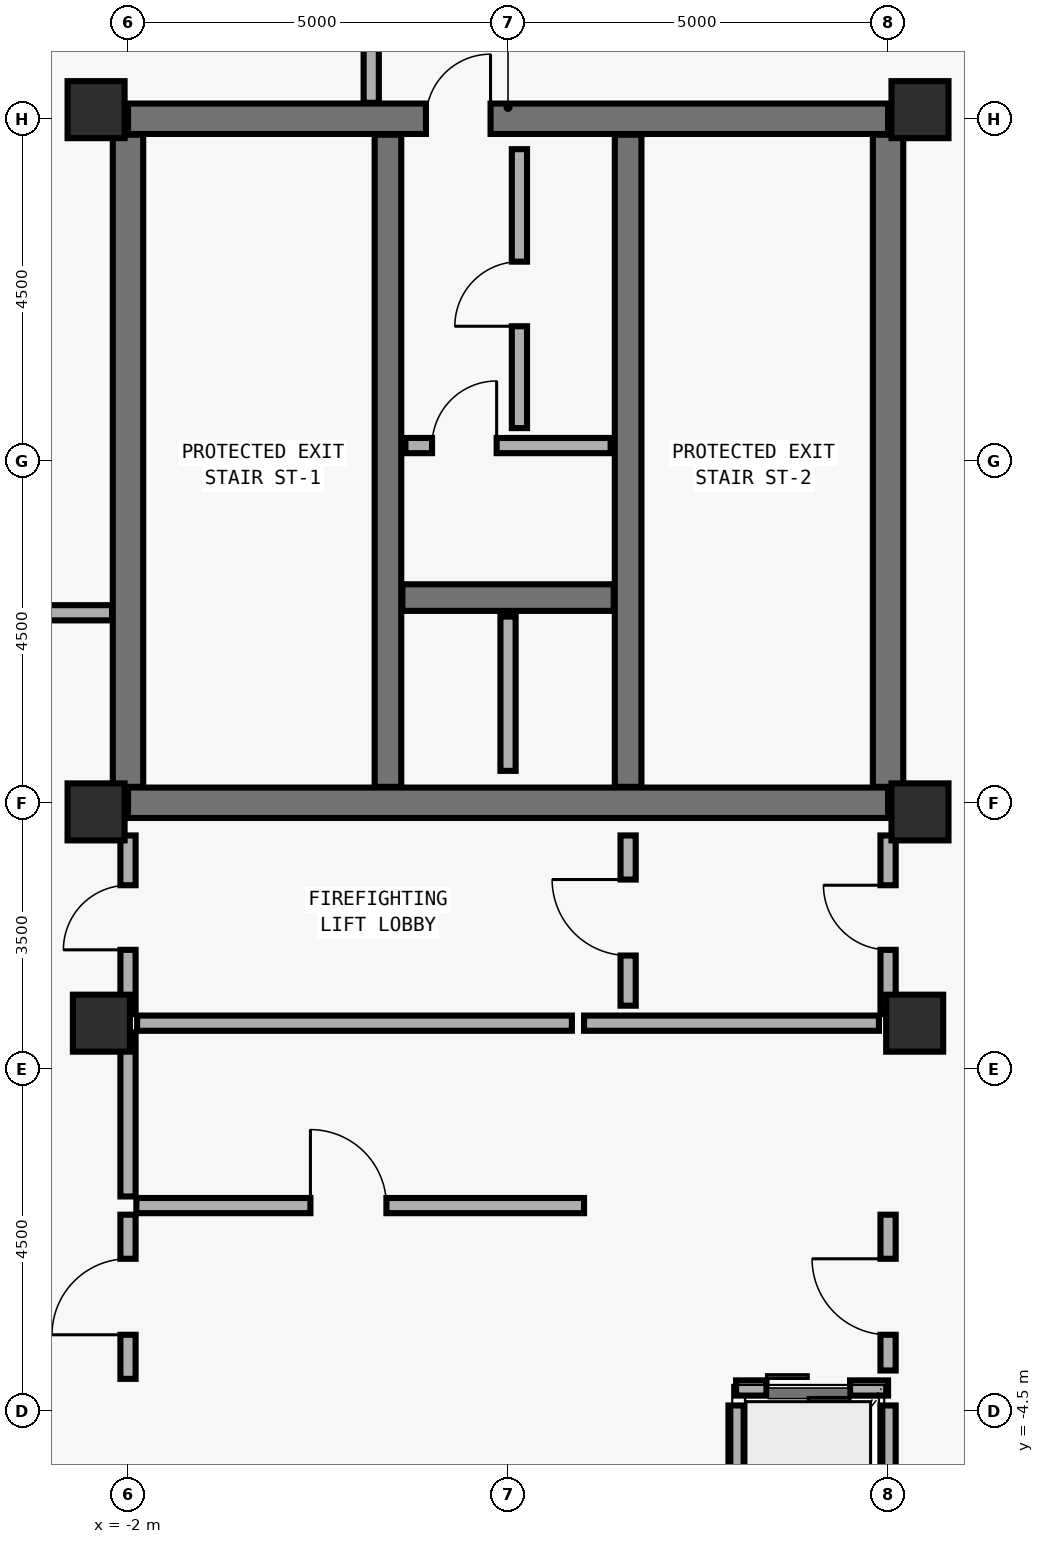
"""IFC4 building model, lengths in metres.
Left out: names, types, materials, properties, quantities, classifications, styles, units other than length and angle.
Written with IfcOpenShell. Run it as: python <this file> out.ifc"""

import sys

from ifc_helpers import new_model, si_unit, direction, frame, frame_2d, origin, origin_2d, place, context, subcontext, project, spatial, rectangle, extrude, element, fill, save


model = new_model("IFC4")
c1 = context("Model", 3, precision=1e-05, world=origin(), true_north=direction((0.0, 1.0)))
c2 = subcontext(c1, "Body", "Model", "MODEL_VIEW")
j1 = project(units=[si_unit("LENGTHUNIT", "METRE"), si_unit("PLANEANGLEUNIT", "RADIAN")], contexts=[c1])
p1 = place(None, origin())
s1 = spatial("IfcSite", under=j1, at=p1, CompositionType="ELEMENT")
p2 = place(p1, origin())
s2 = spatial("IfcBuilding", under=s1, at=p2, CompositionType="ELEMENT")
p3 = place(p2, frame((0.0, 0.0, 306.6)))
s3 = spatial("IfcBuildingStorey", under=s2, at=p3, CompositionType="ELEMENT", Elevation=306.6)
p4 = place(p3, frame((-2.0, 3.5, 0.0), z_axis=(0.0, 0.0, 1.0), x_axis=(1.0, 0.0, 0.0)))
e1 = element("IfcWall", 1, at=p4, inside=s3, PredefinedType="SHEAR", context=c2, shape_type="SweptSolid", body=[
    extrude(rectangle(XDim=10.0, YDim=0.4, at=frame_2d((5.0, 0.0))), origin(), (0.0, 0.0, 1.0), 4.192),
])
p5 = place(p3, frame((-2.0, 12.5, 0.0), z_axis=(0.0, 0.0, 1.0), x_axis=(1.0, 0.0, 0.0)))
e2 = element("IfcWall", 2, at=p5, inside=s3, PredefinedType="SHEAR", context=c2, shape_type="SweptSolid", body=[
    extrude(rectangle(XDim=10.0, YDim=0.4, at=frame_2d((5.0, 0.0))), origin(), (0.0, 0.0, 1.0), 4.192),
])
p6 = place(p5, frame((3.92, 0.0, 0.0)))
e3 = element("IfcOpeningElement", 3, at=p6, cuts=e2, PredefinedType="OPENING", context=c2, shape_type="SweptSolid", body=[
    extrude(rectangle(XDim=0.85, YDim=2.1, at=frame_2d((0.425, 1.05))), frame((0.0, 0.21, 0.0), z_axis=(0.0, -1.0, 0.0), x_axis=(1.0, 0.0, 0.0)), (0.0, 0.0, 1.0), 0.42),
])
for number, where, z_axis, x_axis in (
    (4, (-2.0, 3.71, 0.0), (0.0, 0.0, 1.0), (0.0, 1.0, 0.0)),
    (5, (8.0, 3.71, 0.0), (0.0, 0.0, 1.0), (0.0, 1.0, 0.0)),
):
    element("IfcWall", number, at=place(p3, frame(where, z_axis=z_axis, x_axis=x_axis)), inside=s3, PredefinedType="SHEAR", context=c2, shape_type="SweptSolid", body=[
        extrude(rectangle(XDim=8.58, YDim=0.4, at=frame_2d((4.29, 0.0))), origin(), (0.0, 0.0, 1.0), 4.192),
    ])
for number, where, z_axis, x_axis in (
    (6, (1.42, 3.71, 0.0), (0.0, 0.0, 1.0), (0.0, 1.0, 0.0)),
    (7, (4.58, 3.71, 0.0), (0.0, 0.0, 1.0), (0.0, 1.0, 0.0)),
):
    element("IfcWall", number, at=place(p3, frame(where, z_axis=z_axis, x_axis=x_axis)), inside=s3, PredefinedType="SHEAR", context=c2, shape_type="SweptSolid", body=[
        extrude(rectangle(XDim=8.58, YDim=0.35, at=frame_2d((4.29, 0.0))), origin(), (0.0, 0.0, 1.0), 4.192),
    ])
p7 = place(p3, frame((1.61, 6.2, 0.0), z_axis=(0.0, 0.0, 1.0), x_axis=(1.0, 0.0, 0.0)))
e8 = element("IfcWall", 8, at=p7, inside=s3, PredefinedType="SHEAR", context=c2, shape_type="SweptSolid", body=[
    extrude(rectangle(XDim=2.78, YDim=0.35, at=frame_2d((1.39, 0.0))), origin(), (0.0, 0.0, 1.0), 4.192),
])
for number, where, z_axis, x_axis in (
    (9, (-2.42, 12.62, 0.0), (0.0, 0.0, 1.0), (1.0, 0.0, 0.0)),
    (10, (8.42, 12.62, 0.0), (0.0, 0.0, 1.0), (1.0, 0.0, 0.0)),
    (11, (-2.42, 3.38, 0.0), (0.0, 0.0, 1.0), (1.0, 0.0, 0.0)),
    (12, (8.42, 3.38, 0.0), (0.0, 0.0, 1.0), (1.0, 0.0, 0.0)),
    (13, (-2.35, 0.6, 0.0), (0.0, 0.0, 1.0), (1.0, 0.0, 0.0)),
    (14, (8.35, 0.6, 0.0), (0.0, 0.0, 1.0), (1.0, 0.0, 0.0)),
):
    element("IfcColumn", number, at=place(p3, frame(where, z_axis=z_axis, x_axis=x_axis)), inside=s3, PredefinedType="COLUMN", context=c2, shape_type="SweptSolid", body=[
        extrude(rectangle(XDim=0.75, YDim=0.75, at=origin_2d()), origin(), (0.0, 0.0, 1.0), 4.175),
    ])
p8 = place(p3, frame((3.0, 3.92, 0.0), z_axis=(0.0, 0.0, 1.0), x_axis=(0.0, 1.0, 0.0)))
e15 = element("IfcWall", 15, at=p8, inside=s3, PredefinedType="SOLIDWALL", context=c2, shape_type="SweptSolid", body=[
    extrude(rectangle(XDim=2.03, YDim=0.2, at=frame_2d((1.015, 0.0))), origin(), (0.0, 0.0, 1.0), 3.96),
])
p9 = place(p3, frame((4.0, 0.6, 0.0), z_axis=(0.0, 0.0, 1.0), x_axis=(1.0, 0.0, 0.0)))
e16 = element("IfcWall", 16, at=p9, inside=s3, PredefinedType="SOLIDWALL", context=c2, shape_type="SweptSolid", body=[
    extrude(rectangle(XDim=3.88, YDim=0.2, at=frame_2d((1.94, 0.0))), origin(), (0.0, 0.0, 1.0), 3.672),
])
p10 = place(p3, frame((6.0, -4.2, 0.0), z_axis=(0.0, 0.0, 1.0), x_axis=(1.0, 0.0, 0.0)))
e17 = element("IfcWall", 17, at=p10, inside=s3, PredefinedType="SOLIDWALL", context=c2, shape_type="SweptSolid", body=[
    extrude(rectangle(XDim=2.0, YDim=0.2, at=frame_2d((1.0, 0.0))), origin(), (0.0, 0.0, 1.0), 3.96),
])
p11 = place(p10, frame((0.4, 0.0, 0.0)))
e18 = element("IfcOpeningElement", 18, at=p11, cuts=e17, PredefinedType="OPENING", context=c2, shape_type="SweptSolid", body=[
    extrude(rectangle(XDim=1.1, YDim=2.2, at=frame_2d((0.55, 1.1))), frame((0.0, 0.11, 0.0), z_axis=(0.0, -1.0, 0.0), x_axis=(1.0, 0.0, 0.0)), (0.0, 0.0, 1.0), 0.22),
])
p12 = place(p3, frame((6.0, -6.37, 0.0), z_axis=(0.0, 0.0, 1.0), x_axis=(0.0, 1.0, 0.0)))
e19 = element("IfcWall", 19, at=p12, inside=s3, PredefinedType="SOLIDWALL", context=c2, shape_type="SweptSolid", body=[
    extrude(rectangle(XDim=1.94, YDim=0.2, at=frame_2d((0.97, 0.0))), origin(), (0.0, 0.0, 1.0), 3.96),
])
p13 = place(p3, frame((8.0, -6.37, 0.0), z_axis=(0.0, 0.0, 1.0), x_axis=(0.0, 1.0, 0.0)))
e20 = element("IfcWall", 20, at=p13, inside=s3, PredefinedType="SOLIDWALL", context=c2, shape_type="SweptSolid", body=[
    extrude(rectangle(XDim=1.94, YDim=0.2, at=frame_2d((0.97, 0.0))), origin(), (0.0, 0.0, 1.0), 3.672),
])
p14 = place(p3, frame((1.65, 8.2, 0.0), z_axis=(0.0, 0.0, 1.0), x_axis=(1.0, 0.0, 0.0)))
e21 = element("IfcWall", 21, at=p14, inside=s3, PredefinedType="MOVABLE", context=c2, shape_type="SweptSolid", body=[
    extrude(rectangle(XDim=2.7, YDim=0.2, at=frame_2d((1.35, 0.0))), origin(), (0.0, 0.0, 1.0), 3.96),
])
p15 = place(p14, frame((0.35, 0.0, 0.0)))
e22 = element("IfcOpeningElement", 22, at=p15, cuts=e21, PredefinedType="OPENING", context=c2, shape_type="SweptSolid", body=[
    extrude(rectangle(XDim=0.85, YDim=2.1, at=frame_2d((0.425, 1.05))), frame((0.0, 0.11, 0.0), z_axis=(0.0, -1.0, 0.0), x_axis=(1.0, 0.0, 0.0)), (0.0, 0.0, 1.0), 0.22),
])
p16 = place(p3, frame((3.15, 8.43, 0.0), z_axis=(0.0, 0.0, 1.0), x_axis=(0.0, 1.0, 0.0)))
e23 = element("IfcWall", 23, at=p16, inside=s3, PredefinedType="MOVABLE", context=c2, shape_type="SweptSolid", body=[
    extrude(rectangle(XDim=3.67, YDim=0.2, at=frame_2d((1.835, 0.0))), origin(), (0.0, 0.0, 1.0), 3.96),
])
p17 = place(p16, frame((1.34, 0.0, 0.0)))
e24 = element("IfcOpeningElement", 24, at=p17, cuts=e23, PredefinedType="OPENING", context=c2, shape_type="SweptSolid", body=[
    extrude(rectangle(XDim=0.85, YDim=2.1, at=frame_2d((0.425, 1.05))), frame((0.0, 0.11, 0.0), z_axis=(0.0, -1.0, 0.0), x_axis=(1.0, 0.0, 0.0)), (0.0, 0.0, 1.0), 0.22),
])
p18 = place(p3, frame((4.58, 0.83, 0.0), z_axis=(0.0, 0.0, 1.0), x_axis=(0.0, 1.0, 0.0)))
e25 = element("IfcWall", 25, at=p18, inside=s3, PredefinedType="MOVABLE", context=c2, shape_type="SweptSolid", body=[
    extrude(rectangle(XDim=2.24, YDim=0.2, at=frame_2d((1.12, 0.0))), origin(), (0.0, 0.0, 1.0), 3.96),
])
p19 = place(p18, frame((0.66, 0.0, 0.0)))
e26 = element("IfcOpeningElement", 26, at=p19, cuts=e25, PredefinedType="OPENING", context=c2, shape_type="SweptSolid", body=[
    extrude(rectangle(XDim=1.0, YDim=2.1, at=frame_2d((0.5, 1.05))), frame((0.0, 0.11, 0.0), z_axis=(0.0, -1.0, 0.0), x_axis=(1.0, 0.0, 0.0)), (0.0, 0.0, 1.0), 0.22),
])
p20 = place(p3, frame((-2.0, 0.72, 0.0), z_axis=(0.0, 0.0, 1.0), x_axis=(0.0, 1.0, 0.0)))
e27 = element("IfcWall", 27, at=p20, inside=s3, PredefinedType="MOVABLE", context=c2, shape_type="SweptSolid", body=[
    extrude(rectangle(XDim=2.35, YDim=0.2, at=frame_2d((1.175, 0.0))), origin(), (0.0, 0.0, 1.0), 3.292),
])
p21 = place(p20, frame((0.845, 0.0, 0.0)))
e28 = element("IfcOpeningElement", 28, at=p21, cuts=e27, PredefinedType="OPENING", context=c2, shape_type="SweptSolid", body=[
    extrude(rectangle(XDim=0.85, YDim=2.1, at=frame_2d((0.425, 1.05))), frame((0.0, 0.11, 0.0), z_axis=(0.0, -1.0, 0.0), x_axis=(1.0, 0.0, 0.0)), (0.0, 0.0, 1.0), 0.22),
])
p22 = place(p3, frame((8.0, 0.72, 0.0), z_axis=(0.0, 0.0, 1.0), x_axis=(0.0, 1.0, 0.0)))
e29 = element("IfcWall", 29, at=p22, inside=s3, PredefinedType="MOVABLE", context=c2, shape_type="SweptSolid", body=[
    extrude(rectangle(XDim=2.35, YDim=0.2, at=frame_2d((1.175, 0.0))), origin(), (0.0, 0.0, 1.0), 3.292),
])
p23 = place(p22, frame((0.845, 0.0, 0.0)))
e30 = element("IfcOpeningElement", 30, at=p23, cuts=e29, PredefinedType="OPENING", context=c2, shape_type="SweptSolid", body=[
    extrude(rectangle(XDim=0.85, YDim=2.1, at=frame_2d((0.425, 1.05))), frame((0.0, 0.11, 0.0), z_axis=(0.0, -1.0, 0.0), x_axis=(1.0, 0.0, 0.0)), (0.0, 0.0, 1.0), 0.22),
])
p24 = place(p3, frame((-2.0, -4.08, 0.0), z_axis=(0.0, 0.0, 1.0), x_axis=(0.0, 1.0, 0.0)))
e31 = element("IfcWall", 31, at=p24, inside=s3, PredefinedType="MOVABLE", context=c2, shape_type="SweptSolid", body=[
    extrude(rectangle(XDim=2.16, YDim=0.2, at=frame_2d((1.08, 0.0))), origin(), (0.0, 0.0, 1.0), 3.672),
])
p25 = place(p24, frame((0.58, 0.0, 0.0)))
e32 = element("IfcOpeningElement", 32, at=p25, cuts=e31, PredefinedType="OPENING", context=c2, shape_type="SweptSolid", body=[
    extrude(rectangle(XDim=1.0, YDim=2.1, at=frame_2d((0.5, 1.05))), frame((0.0, 0.11, 0.0), z_axis=(0.0, -1.0, 0.0), x_axis=(1.0, 0.0, 0.0)), (0.0, 0.0, 1.0), 0.22),
])
p26 = place(p3, frame((8.0, -3.97, 0.0), z_axis=(0.0, 0.0, 1.0), x_axis=(0.0, 1.0, 0.0)))
e33 = element("IfcWall", 33, at=p26, inside=s3, PredefinedType="MOVABLE", context=c2, shape_type="SweptSolid", body=[
    extrude(rectangle(XDim=2.05, YDim=0.2, at=frame_2d((1.025, 0.0))), origin(), (0.0, 0.0, 1.0), 3.672),
])
p27 = place(p26, frame((0.47, 0.0, 0.0)))
e34 = element("IfcOpeningElement", 34, at=p27, cuts=e33, PredefinedType="OPENING", context=c2, shape_type="SweptSolid", body=[
    extrude(rectangle(XDim=1.0, YDim=2.1, at=frame_2d((0.5, 1.05))), frame((0.0, 0.11, 0.0), z_axis=(0.0, -1.0, 0.0), x_axis=(1.0, 0.0, 0.0)), (0.0, 0.0, 1.0), 0.22),
])
p28 = place(p3, frame((-1.89, -1.8, 0.0), z_axis=(0.0, 0.0, 1.0), x_axis=(1.0, 0.0, 0.0)))
e35 = element("IfcWall", 35, at=p28, inside=s3, PredefinedType="MOVABLE", context=c2, shape_type="SweptSolid", body=[
    extrude(rectangle(XDim=5.89, YDim=0.2, at=frame_2d((2.945, 0.0))), origin(), (0.0, 0.0, 1.0), 3.96),
])
p29 = place(p28, frame((2.29, 0.0, 0.0)))
e36 = element("IfcOpeningElement", 36, at=p29, cuts=e35, PredefinedType="OPENING", context=c2, shape_type="SweptSolid", body=[
    extrude(rectangle(XDim=1.0, YDim=2.1, at=frame_2d((0.5, 1.05))), frame((0.0, 0.11, 0.0), z_axis=(0.0, -1.0, 0.0), x_axis=(1.0, 0.0, 0.0)), (0.0, 0.0, 1.0), 0.22),
])
p30 = place(p3, frame((-1.88, 0.6, 0.0), z_axis=(0.0, 0.0, 1.0), x_axis=(1.0, 0.0, 0.0)))
e37 = element("IfcWall", 37, at=p30, inside=s3, PredefinedType="MOVABLE", context=c2, shape_type="SweptSolid", body=[
    extrude(rectangle(XDim=5.72, YDim=0.2, at=frame_2d((2.86, 0.0))), origin(), (0.0, 0.0, 1.0), 3.672),
])
p31 = place(p3, frame((-2.0, -1.68, 0.0), z_axis=(0.0, 0.0, 1.0), x_axis=(0.0, 1.0, 0.0)))
e38 = element("IfcWall", 38, at=p31, inside=s3, PredefinedType="MOVABLE", context=c2, shape_type="SweptSolid", body=[
    extrude(rectangle(XDim=2.16, YDim=0.2, at=frame_2d((1.08, 0.0))), origin(), (0.0, 0.0, 1.0), 3.672),
])
p32 = place(p3, frame((-2.21, 6.0, 0.0), z_axis=(0.0, 0.0, 1.0), x_axis=(-1.0, 0.0, 0.0)))
e39 = element("IfcWall", 39, at=p32, inside=s3, PredefinedType="MOVABLE", context=c2, shape_type="SweptSolid", body=[
    extrude(rectangle(XDim=2.28, YDim=0.2, at=frame_2d((1.14, 0.0))), origin(), (0.0, 0.0, 1.0), 3.96),
])
p33 = place(p3, frame((1.2, 14.49, 0.0), z_axis=(0.0, 0.0, 1.0), x_axis=(0.0, -1.0, 0.0)))
e40 = element("IfcWall", 40, at=p33, inside=s3, PredefinedType="MOVABLE", context=c2, shape_type="SweptSolid", body=[
    extrude(rectangle(XDim=1.78, YDim=0.2, at=frame_2d((0.89, 0.0))), origin(), (0.0, 0.0, 1.0), 3.96),
])
p34 = place(p6, origin())
e41 = element("IfcDoor", 41, at=p34, inside=s3, OperationType="SINGLE_SWING_RIGHT", PredefinedType="DOOR", context=c2, shape_type="SweptSolid", body=[
    extrude(rectangle(XDim=0.85, YDim=2.1, at=frame_2d((0.425, 1.05))), frame((0.0, 0.025, 0.0), z_axis=(0.0, -1.0, 0.0), x_axis=(1.0, 0.0, 0.0)), (0.0, 0.0, 1.0), 0.05),
])
fill(e3, e41)
p35 = place(p15, origin())
e42 = element("IfcDoor", 42, at=p35, inside=s3, OperationType="SINGLE_SWING_RIGHT", PredefinedType="DOOR", context=c2, shape_type="SweptSolid", body=[
    extrude(rectangle(XDim=0.85, YDim=2.1, at=frame_2d((0.425, 1.05))), frame((0.0, 0.025, 0.0), z_axis=(0.0, -1.0, 0.0), x_axis=(1.0, 0.0, 0.0)), (0.0, 0.0, 1.0), 0.05),
])
fill(e22, e42)
p36 = place(p17, origin())
e43 = element("IfcDoor", 43, at=p36, inside=s3, OperationType="SINGLE_SWING_LEFT", PredefinedType="DOOR", context=c2, shape_type="SweptSolid", body=[
    extrude(rectangle(XDim=0.85, YDim=2.1, at=frame_2d((0.425, 1.05))), frame((0.0, 0.025, 0.0), z_axis=(0.0, -1.0, 0.0), x_axis=(1.0, 0.0, 0.0)), (0.0, 0.0, 1.0), 0.05),
])
fill(e24, e43)
p37 = place(p19, origin())
e44 = element("IfcDoor", 44, at=p37, inside=s3, OperationType="SINGLE_SWING_RIGHT", PredefinedType="DOOR", context=c2, shape_type="SweptSolid", body=[
    extrude(rectangle(XDim=1.0, YDim=2.1, at=frame_2d((0.5, 1.05))), frame((0.0, 0.025, 0.0), z_axis=(0.0, -1.0, 0.0), x_axis=(1.0, 0.0, 0.0)), (0.0, 0.0, 1.0), 0.05),
])
fill(e26, e44)
p38 = place(p21, origin())
e45 = element("IfcDoor", 45, at=p38, inside=s3, OperationType="SINGLE_SWING_LEFT", PredefinedType="DOOR", context=c2, shape_type="SweptSolid", body=[
    extrude(rectangle(XDim=0.85, YDim=2.1, at=frame_2d((0.425, 1.05))), frame((0.0, 0.025, 0.0), z_axis=(0.0, -1.0, 0.0), x_axis=(1.0, 0.0, 0.0)), (0.0, 0.0, 1.0), 0.05),
])
fill(e28, e45)
p39 = place(p23, origin())
e46 = element("IfcDoor", 46, at=p39, inside=s3, OperationType="SINGLE_SWING_RIGHT", PredefinedType="DOOR", context=c2, shape_type="SweptSolid", body=[
    extrude(rectangle(XDim=0.85, YDim=2.1, at=frame_2d((0.425, 1.05))), frame((0.0, 0.025, 0.0), z_axis=(0.0, -1.0, 0.0), x_axis=(1.0, 0.0, 0.0)), (0.0, 0.0, 1.0), 0.05),
])
fill(e30, e46)
p40 = place(p25, origin())
e47 = element("IfcDoor", 47, at=p40, inside=s3, OperationType="SINGLE_SWING_LEFT", PredefinedType="DOOR", context=c2, shape_type="SweptSolid", body=[
    extrude(rectangle(XDim=1.0, YDim=2.1, at=frame_2d((0.5, 1.05))), frame((0.0, 0.025, 0.0), z_axis=(0.0, -1.0, 0.0), x_axis=(1.0, 0.0, 0.0)), (0.0, 0.0, 1.0), 0.05),
])
fill(e32, e47)
p41 = place(p27, origin())
e48 = element("IfcDoor", 48, at=p41, inside=s3, OperationType="SINGLE_SWING_RIGHT", PredefinedType="DOOR", context=c2, shape_type="SweptSolid", body=[
    extrude(rectangle(XDim=1.0, YDim=2.1, at=frame_2d((0.5, 1.05))), frame((0.0, 0.025, 0.0), z_axis=(0.0, -1.0, 0.0), x_axis=(1.0, 0.0, 0.0)), (0.0, 0.0, 1.0), 0.05),
])
fill(e34, e48)
p42 = place(p29, origin())
e49 = element("IfcDoor", 49, at=p42, inside=s3, OperationType="SINGLE_SWING_LEFT", PredefinedType="DOOR", context=c2, shape_type="SweptSolid", body=[
    extrude(rectangle(XDim=1.0, YDim=2.1, at=frame_2d((0.5, 1.05))), frame((0.0, 0.025, 0.0), z_axis=(0.0, -1.0, 0.0), x_axis=(1.0, 0.0, 0.0)), (0.0, 0.0, 1.0), 0.05),
])
fill(e36, e49)
p43 = place(p11, origin())
e50 = element("IfcDoor", 50, at=p43, inside=s3, OperationType="DOUBLE_DOOR_SLIDING", PredefinedType="DOOR", context=c2, shape_type="SweptSolid", body=[
    extrude(rectangle(XDim=1.1, YDim=2.2, at=frame_2d((0.55, 1.1))), frame((0.0, 0.025, 0.0), z_axis=(0.0, -1.0, 0.0), x_axis=(1.0, 0.0, 0.0)), (0.0, 0.0, 1.0), 0.05),
])
fill(e18, e50)
save(model, sys.argv[1])
